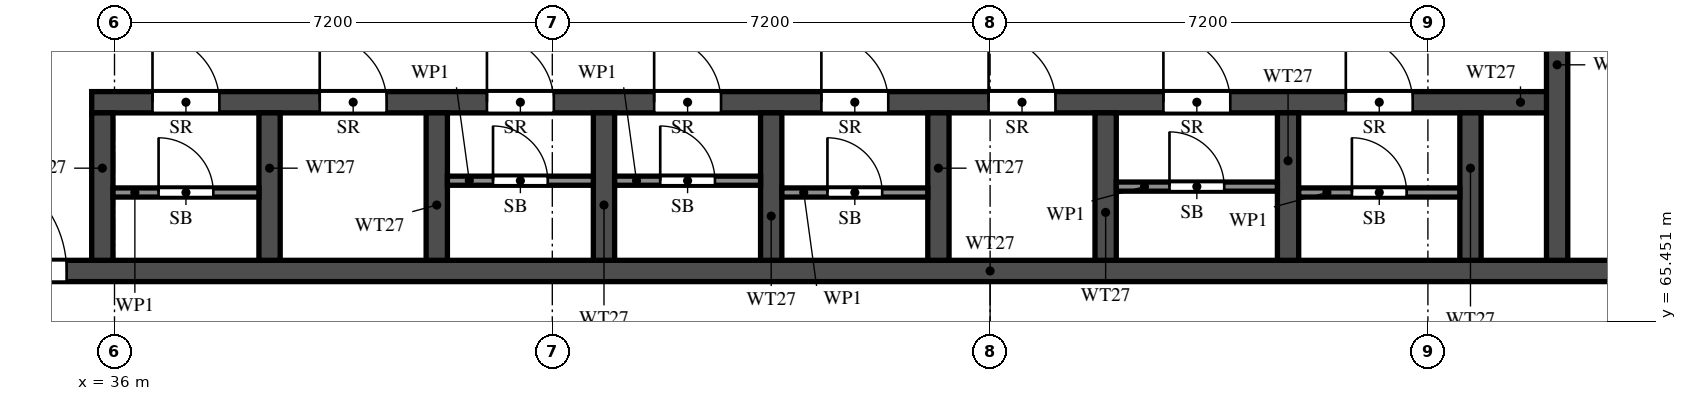
"""IFC4 building model, lengths in metres.
Left out: names, types, materials, properties, quantities, classifications, styles, units other than length and angle.
Written with IfcOpenShell. Run it as: python <this file> out.ifc"""

import sys

from ifc_helpers import new_model, si_unit, direction, frame, frame_2d, origin, place, context, subcontext, project, spatial, rectangle, extrude, element, fill, save


model = new_model("IFC4")
c1 = context("Model", 3, precision=1e-05, world=origin(), true_north=direction((0.0, 1.0)))
c2 = subcontext(c1, "Body", "Model", "MODEL_VIEW")
j1 = project(units=[si_unit("LENGTHUNIT", "METRE"), si_unit("PLANEANGLEUNIT", "RADIAN")], contexts=[c1])
p1 = place(None, origin())
s1 = spatial("IfcSite", under=j1, at=p1, CompositionType="ELEMENT")
p2 = place(p1, origin())
s2 = spatial("IfcBuilding", under=s1, at=p2, CompositionType="ELEMENT")
p3 = place(p2, frame((0.0, 0.0, 178.0)))
s3 = spatial("IfcBuildingStorey", under=s2, at=p3, CompositionType="ELEMENT", Elevation=178.0)
p4 = place(p3, frame((29.7, 66.275, 0.0), z_axis=(0.0, 0.0, 1.0), x_axis=(1.0, 0.0, 0.0)))
e1 = element("IfcWall", 1, at=p4, inside=s3, PredefinedType="SHEAR", context=c2, shape_type="SweptSolid", body=[
    extrude(rectangle(XDim=41.4, YDim=0.35, at=frame_2d((20.7, 0.0))), origin(), (0.0, 0.0, 1.0), 3.2),
])
p5 = place(p4, frame((0.925, 0.0, 0.0)))
e2 = element("IfcOpeningElement", 2, at=p5, cuts=e1, PredefinedType="OPENING", context=c2, shape_type="SweptSolid", body=[
    extrude(rectangle(XDim=1.1, YDim=2.1, at=frame_2d((0.55, 1.05))), frame((0.0, 0.185, 0.0), z_axis=(0.0, -1.0, 0.0), x_axis=(1.0, 0.0, 0.0)), (0.0, 0.0, 1.0), 0.37),
])
p6 = place(p4, frame((3.712, 0.0, 0.0)))
e3 = element("IfcOpeningElement", 3, at=p6, cuts=e1, PredefinedType="OPENING", context=c2, shape_type="SweptSolid", body=[
    extrude(rectangle(XDim=1.8, YDim=2.1, at=frame_2d((0.9, 1.05))), frame((0.0, 0.185, 0.0), z_axis=(0.0, -1.0, 0.0), x_axis=(1.0, 0.0, 0.0)), (0.0, 0.0, 1.0), 0.37),
])
p7 = place(p3, frame((35.625, 69.05, 0.0), z_axis=(0.0, 0.0, 1.0), x_axis=(1.0, 0.0, 0.0)))
e4 = element("IfcWall", 4, at=p7, inside=s3, PredefinedType="SHEAR", context=c2, shape_type="SweptSolid", body=[
    extrude(rectangle(XDim=24.1, YDim=0.35, at=frame_2d((12.05, 0.0))), origin(), (0.0, 0.0, 1.0), 3.2),
])
p8 = place(p7, frame((1.0, 0.0, 0.0)))
e5 = element("IfcOpeningElement", 5, at=p8, cuts=e4, PredefinedType="OPENING", context=c2, shape_type="SweptSolid", body=[
    extrude(rectangle(XDim=1.1, YDim=2.1, at=frame_2d((0.55, 1.05))), frame((0.0, 0.185, 0.0), z_axis=(0.0, -1.0, 0.0), x_axis=(1.0, 0.0, 0.0)), (0.0, 0.0, 1.0), 0.37),
])
p9 = place(p7, frame((3.75, 0.0, 0.0)))
e6 = element("IfcOpeningElement", 6, at=p9, cuts=e4, PredefinedType="OPENING", context=c2, shape_type="SweptSolid", body=[
    extrude(rectangle(XDim=1.1, YDim=2.1, at=frame_2d((0.55, 1.05))), frame((0.0, 0.185, 0.0), z_axis=(0.0, -1.0, 0.0), x_axis=(1.0, 0.0, 0.0)), (0.0, 0.0, 1.0), 0.37),
])
p10 = place(p7, frame((6.5, 0.0, 0.0)))
e7 = element("IfcOpeningElement", 7, at=p10, cuts=e4, PredefinedType="OPENING", context=c2, shape_type="SweptSolid", body=[
    extrude(rectangle(XDim=1.1, YDim=2.1, at=frame_2d((0.55, 1.05))), frame((0.0, 0.185, 0.0), z_axis=(0.0, -1.0, 0.0), x_axis=(1.0, 0.0, 0.0)), (0.0, 0.0, 1.0), 0.37),
])
p11 = place(p7, frame((9.25, 0.0, 0.0)))
e8 = element("IfcOpeningElement", 8, at=p11, cuts=e4, PredefinedType="OPENING", context=c2, shape_type="SweptSolid", body=[
    extrude(rectangle(XDim=1.1, YDim=2.1, at=frame_2d((0.55, 1.05))), frame((0.0, 0.185, 0.0), z_axis=(0.0, -1.0, 0.0), x_axis=(1.0, 0.0, 0.0)), (0.0, 0.0, 1.0), 0.37),
])
p12 = place(p7, frame((12.0, 0.0, 0.0)))
e9 = element("IfcOpeningElement", 9, at=p12, cuts=e4, PredefinedType="OPENING", context=c2, shape_type="SweptSolid", body=[
    extrude(rectangle(XDim=1.1, YDim=2.1, at=frame_2d((0.55, 1.05))), frame((0.0, 0.185, 0.0), z_axis=(0.0, -1.0, 0.0), x_axis=(1.0, 0.0, 0.0)), (0.0, 0.0, 1.0), 0.37),
])
p13 = place(p7, frame((14.75, 0.0, 0.0)))
e10 = element("IfcOpeningElement", 10, at=p13, cuts=e4, PredefinedType="OPENING", context=c2, shape_type="SweptSolid", body=[
    extrude(rectangle(XDim=1.1, YDim=2.1, at=frame_2d((0.55, 1.05))), frame((0.0, 0.185, 0.0), z_axis=(0.0, -1.0, 0.0), x_axis=(1.0, 0.0, 0.0)), (0.0, 0.0, 1.0), 0.37),
])
p14 = place(p7, frame((17.625, 0.0, 0.0)))
e11 = element("IfcOpeningElement", 11, at=p14, cuts=e4, PredefinedType="OPENING", context=c2, shape_type="SweptSolid", body=[
    extrude(rectangle(XDim=1.1, YDim=2.1, at=frame_2d((0.55, 1.05))), frame((0.0, 0.185, 0.0), z_axis=(0.0, -1.0, 0.0), x_axis=(1.0, 0.0, 0.0)), (0.0, 0.0, 1.0), 0.37),
])
p15 = place(p7, frame((20.625, 0.0, 0.0)))
e12 = element("IfcOpeningElement", 12, at=p15, cuts=e4, PredefinedType="OPENING", context=c2, shape_type="SweptSolid", body=[
    extrude(rectangle(XDim=1.1, YDim=2.1, at=frame_2d((0.55, 1.05))), frame((0.0, 0.185, 0.0), z_axis=(0.0, -1.0, 0.0), x_axis=(1.0, 0.0, 0.0)), (0.0, 0.0, 1.0), 0.37),
])
p16 = place(p3, frame((59.725, 66.45, 0.0), z_axis=(0.0, 0.0, 1.0), x_axis=(0.0, 1.0, 0.0)))
e13 = element("IfcWall", 13, at=p16, inside=s3, PredefinedType="SHEAR", context=c2, shape_type="SweptSolid", body=[
    extrude(rectangle(XDim=6.125, YDim=0.35, at=frame_2d((3.062, 0.0))), origin(), (0.0, 0.0, 1.0), 3.2),
])
p17 = place(p16, frame((3.85, 0.0, 0.0)))
e14 = element("IfcOpeningElement", 14, at=p17, cuts=e13, PredefinedType="OPENING", context=c2, shape_type="SweptSolid", body=[
    extrude(rectangle(XDim=1.2, YDim=2.1, at=frame_2d((0.6, 1.05))), frame((0.0, 0.185, 0.0), z_axis=(0.0, -1.0, 0.0), x_axis=(1.0, 0.0, 0.0)), (0.0, 0.0, 1.0), 0.37),
])
for number, where, z_axis, x_axis in (
    (15, (35.8, 66.45, 0.0), (0.0, 0.0, 1.0), (0.0, 1.0, 0.0)),
    (16, (38.55, 66.45, 0.0), (0.0, 0.0, 1.0), (0.0, 1.0, 0.0)),
    (17, (41.3, 66.45, 0.0), (0.0, 0.0, 1.0), (0.0, 1.0, 0.0)),
    (18, (44.05, 66.45, 0.0), (0.0, 0.0, 1.0), (0.0, 1.0, 0.0)),
    (19, (46.8, 66.45, 0.0), (0.0, 0.0, 1.0), (0.0, 1.0, 0.0)),
    (20, (49.55, 66.45, 0.0), (0.0, 0.0, 1.0), (0.0, 1.0, 0.0)),
    (21, (52.3, 66.45, 0.0), (0.0, 0.0, 1.0), (0.0, 1.0, 0.0)),
    (22, (55.3, 66.45, 0.0), (0.0, 0.0, 1.0), (0.0, 1.0, 0.0)),
    (23, (58.3, 66.45, 0.0), (0.0, 0.0, 1.0), (0.0, 1.0, 0.0)),
):
    element("IfcWall", number, at=place(p3, frame(where, z_axis=z_axis, x_axis=x_axis)), inside=s3, PredefinedType="SHEAR", context=c2, shape_type="SweptSolid", body=[
        extrude(rectangle(XDim=2.425, YDim=0.35, at=frame_2d((1.212, 0.0))), origin(), (0.0, 0.0, 1.0), 3.2),
    ])
p18 = place(p3, frame((35.975, 67.565, 0.0), z_axis=(0.0, 0.0, 1.0), x_axis=(1.0, 0.0, 0.0)))
e24 = element("IfcWall", 24, at=p18, inside=s3, PredefinedType="PARTITIONING", context=c2, shape_type="SweptSolid", body=[
    extrude(rectangle(XDim=2.4, YDim=0.15, at=frame_2d((1.2, 0.0))), origin(), (0.0, 0.0, 1.0), 3.2),
])
p19 = place(p18, frame((0.75, 0.0, 0.0)))
e25 = element("IfcOpeningElement", 25, at=p19, cuts=e24, PredefinedType="OPENING", context=c2, shape_type="SweptSolid", body=[
    extrude(rectangle(XDim=0.9, YDim=2.1, at=frame_2d((0.45, 1.05))), frame((0.0, 0.085, 0.0), z_axis=(0.0, -1.0, 0.0), x_axis=(1.0, 0.0, 0.0)), (0.0, 0.0, 1.0), 0.17),
])
p20 = place(p3, frame((41.475, 67.76, 0.0), z_axis=(0.0, 0.0, 1.0), x_axis=(1.0, 0.0, 0.0)))
e26 = element("IfcWall", 26, at=p20, inside=s3, PredefinedType="PARTITIONING", context=c2, shape_type="SweptSolid", body=[
    extrude(rectangle(XDim=2.4, YDim=0.15, at=frame_2d((1.2, 0.0))), origin(), (0.0, 0.0, 1.0), 3.2),
])
p21 = place(p20, frame((0.75, 0.0, 0.0)))
e27 = element("IfcOpeningElement", 27, at=p21, cuts=e26, PredefinedType="OPENING", context=c2, shape_type="SweptSolid", body=[
    extrude(rectangle(XDim=0.9, YDim=2.1, at=frame_2d((0.45, 1.05))), frame((0.0, 0.085, 0.0), z_axis=(0.0, -1.0, 0.0), x_axis=(1.0, 0.0, 0.0)), (0.0, 0.0, 1.0), 0.17),
])
p22 = place(p3, frame((44.225, 67.76, 0.0), z_axis=(0.0, 0.0, 1.0), x_axis=(1.0, 0.0, 0.0)))
e28 = element("IfcWall", 28, at=p22, inside=s3, PredefinedType="PARTITIONING", context=c2, shape_type="SweptSolid", body=[
    extrude(rectangle(XDim=2.4, YDim=0.15, at=frame_2d((1.2, 0.0))), origin(), (0.0, 0.0, 1.0), 3.2),
])
p23 = place(p22, frame((0.75, 0.0, 0.0)))
e29 = element("IfcOpeningElement", 29, at=p23, cuts=e28, PredefinedType="OPENING", context=c2, shape_type="SweptSolid", body=[
    extrude(rectangle(XDim=0.9, YDim=2.1, at=frame_2d((0.45, 1.05))), frame((0.0, 0.085, 0.0), z_axis=(0.0, -1.0, 0.0), x_axis=(1.0, 0.0, 0.0)), (0.0, 0.0, 1.0), 0.17),
])
p24 = place(p3, frame((46.975, 67.565, 0.0), z_axis=(0.0, 0.0, 1.0), x_axis=(1.0, 0.0, 0.0)))
e30 = element("IfcWall", 30, at=p24, inside=s3, PredefinedType="PARTITIONING", context=c2, shape_type="SweptSolid", body=[
    extrude(rectangle(XDim=2.4, YDim=0.15, at=frame_2d((1.2, 0.0))), origin(), (0.0, 0.0, 1.0), 3.2),
])
p25 = place(p24, frame((0.75, 0.0, 0.0)))
e31 = element("IfcOpeningElement", 31, at=p25, cuts=e30, PredefinedType="OPENING", context=c2, shape_type="SweptSolid", body=[
    extrude(rectangle(XDim=0.9, YDim=2.1, at=frame_2d((0.45, 1.05))), frame((0.0, 0.085, 0.0), z_axis=(0.0, -1.0, 0.0), x_axis=(1.0, 0.0, 0.0)), (0.0, 0.0, 1.0), 0.17),
])
p26 = place(p3, frame((52.475, 67.663, 0.0), z_axis=(0.0, 0.0, 1.0), x_axis=(1.0, 0.0, 0.0)))
e32 = element("IfcWall", 32, at=p26, inside=s3, PredefinedType="PARTITIONING", context=c2, shape_type="SweptSolid", body=[
    extrude(rectangle(XDim=2.65, YDim=0.15, at=frame_2d((1.325, 0.0))), origin(), (0.0, 0.0, 1.0), 3.2),
])
p27 = place(p26, frame((0.875, 0.0, 0.0)))
e33 = element("IfcOpeningElement", 33, at=p27, cuts=e32, PredefinedType="OPENING", context=c2, shape_type="SweptSolid", body=[
    extrude(rectangle(XDim=0.9, YDim=2.1, at=frame_2d((0.45, 1.05))), frame((0.0, 0.085, 0.0), z_axis=(0.0, -1.0, 0.0), x_axis=(1.0, 0.0, 0.0)), (0.0, 0.0, 1.0), 0.17),
])
p28 = place(p3, frame((55.475, 67.565, 0.0), z_axis=(0.0, 0.0, 1.0), x_axis=(1.0, 0.0, 0.0)))
e34 = element("IfcWall", 34, at=p28, inside=s3, PredefinedType="PARTITIONING", context=c2, shape_type="SweptSolid", body=[
    extrude(rectangle(XDim=2.65, YDim=0.15, at=frame_2d((1.325, 0.0))), origin(), (0.0, 0.0, 1.0), 3.2),
])
p29 = place(p28, frame((0.875, 0.0, 0.0)))
e35 = element("IfcOpeningElement", 35, at=p29, cuts=e34, PredefinedType="OPENING", context=c2, shape_type="SweptSolid", body=[
    extrude(rectangle(XDim=0.9, YDim=2.1, at=frame_2d((0.45, 1.05))), frame((0.0, 0.085, 0.0), z_axis=(0.0, -1.0, 0.0), x_axis=(1.0, 0.0, 0.0)), (0.0, 0.0, 1.0), 0.17),
])
p30 = place(p6, origin())
e36 = element("IfcDoor", 36, at=p30, inside=s3, OperationType="DOUBLE_DOOR_SINGLE_SWING", PredefinedType="DOOR", context=c2, shape_type="SweptSolid", body=[
    extrude(rectangle(XDim=1.8, YDim=2.1, at=frame_2d((0.9, 1.05))), frame((0.0, 0.025, 0.0), z_axis=(0.0, -1.0, 0.0), x_axis=(1.0, 0.0, 0.0)), (0.0, 0.0, 1.0), 0.05),
])
fill(e3, e36)
p31 = place(p8, origin())
e37 = element("IfcDoor", 37, at=p31, inside=s3, OperationType="SINGLE_SWING_RIGHT", PredefinedType="DOOR", context=c2, shape_type="SweptSolid", body=[
    extrude(rectangle(XDim=1.1, YDim=2.1, at=frame_2d((0.55, 1.05))), frame((0.0, 0.025, 0.0), z_axis=(0.0, -1.0, 0.0), x_axis=(1.0, 0.0, 0.0)), (0.0, 0.0, 1.0), 0.05),
])
fill(e5, e37)
p32 = place(p19, origin())
e38 = element("IfcDoor", 38, at=p32, inside=s3, OperationType="SINGLE_SWING_RIGHT", PredefinedType="DOOR", context=c2, shape_type="SweptSolid", body=[
    extrude(rectangle(XDim=0.9, YDim=2.1, at=frame_2d((0.45, 1.05))), frame((0.0, 0.025, 0.0), z_axis=(0.0, -1.0, 0.0), x_axis=(1.0, 0.0, 0.0)), (0.0, 0.0, 1.0), 0.05),
])
fill(e25, e38)
p33 = place(p9, origin())
e39 = element("IfcDoor", 39, at=p33, inside=s3, OperationType="SINGLE_SWING_LEFT", PredefinedType="DOOR", context=c2, shape_type="SweptSolid", body=[
    extrude(rectangle(XDim=1.1, YDim=2.1, at=frame_2d((0.55, 1.05))), frame((0.0, 0.025, 0.0), z_axis=(0.0, -1.0, 0.0), x_axis=(1.0, 0.0, 0.0)), (0.0, 0.0, 1.0), 0.05),
])
fill(e6, e39)
p34 = place(p10, origin())
e40 = element("IfcDoor", 40, at=p34, inside=s3, OperationType="SINGLE_SWING_RIGHT", PredefinedType="DOOR", context=c2, shape_type="SweptSolid", body=[
    extrude(rectangle(XDim=1.1, YDim=2.1, at=frame_2d((0.55, 1.05))), frame((0.0, 0.025, 0.0), z_axis=(0.0, -1.0, 0.0), x_axis=(1.0, 0.0, 0.0)), (0.0, 0.0, 1.0), 0.05),
])
fill(e7, e40)
p35 = place(p21, origin())
e41 = element("IfcDoor", 41, at=p35, inside=s3, OperationType="SINGLE_SWING_LEFT", PredefinedType="DOOR", context=c2, shape_type="SweptSolid", body=[
    extrude(rectangle(XDim=0.9, YDim=2.1, at=frame_2d((0.45, 1.05))), frame((0.0, 0.025, 0.0), z_axis=(0.0, -1.0, 0.0), x_axis=(1.0, 0.0, 0.0)), (0.0, 0.0, 1.0), 0.05),
])
fill(e27, e41)
p36 = place(p11, origin())
e42 = element("IfcDoor", 42, at=p36, inside=s3, OperationType="SINGLE_SWING_LEFT", PredefinedType="DOOR", context=c2, shape_type="SweptSolid", body=[
    extrude(rectangle(XDim=1.1, YDim=2.1, at=frame_2d((0.55, 1.05))), frame((0.0, 0.025, 0.0), z_axis=(0.0, -1.0, 0.0), x_axis=(1.0, 0.0, 0.0)), (0.0, 0.0, 1.0), 0.05),
])
fill(e8, e42)
p37 = place(p23, origin())
e43 = element("IfcDoor", 43, at=p37, inside=s3, OperationType="SINGLE_SWING_RIGHT", PredefinedType="DOOR", context=c2, shape_type="SweptSolid", body=[
    extrude(rectangle(XDim=0.9, YDim=2.1, at=frame_2d((0.45, 1.05))), frame((0.0, 0.025, 0.0), z_axis=(0.0, -1.0, 0.0), x_axis=(1.0, 0.0, 0.0)), (0.0, 0.0, 1.0), 0.05),
])
fill(e29, e43)
p38 = place(p12, origin())
e44 = element("IfcDoor", 44, at=p38, inside=s3, OperationType="SINGLE_SWING_RIGHT", PredefinedType="DOOR", context=c2, shape_type="SweptSolid", body=[
    extrude(rectangle(XDim=1.1, YDim=2.1, at=frame_2d((0.55, 1.05))), frame((0.0, 0.025, 0.0), z_axis=(0.0, -1.0, 0.0), x_axis=(1.0, 0.0, 0.0)), (0.0, 0.0, 1.0), 0.05),
])
fill(e9, e44)
p39 = place(p25, origin())
e45 = element("IfcDoor", 45, at=p39, inside=s3, OperationType="SINGLE_SWING_RIGHT", PredefinedType="DOOR", context=c2, shape_type="SweptSolid", body=[
    extrude(rectangle(XDim=0.9, YDim=2.1, at=frame_2d((0.45, 1.05))), frame((0.0, 0.025, 0.0), z_axis=(0.0, -1.0, 0.0), x_axis=(1.0, 0.0, 0.0)), (0.0, 0.0, 1.0), 0.05),
])
fill(e31, e45)
p40 = place(p13, origin())
e46 = element("IfcDoor", 46, at=p40, inside=s3, OperationType="SINGLE_SWING_LEFT", PredefinedType="DOOR", context=c2, shape_type="SweptSolid", body=[
    extrude(rectangle(XDim=1.1, YDim=2.1, at=frame_2d((0.55, 1.05))), frame((0.0, 0.025, 0.0), z_axis=(0.0, -1.0, 0.0), x_axis=(1.0, 0.0, 0.0)), (0.0, 0.0, 1.0), 0.05),
])
fill(e10, e46)
p41 = place(p14, origin())
e47 = element("IfcDoor", 47, at=p41, inside=s3, OperationType="SINGLE_SWING_RIGHT", PredefinedType="DOOR", context=c2, shape_type="SweptSolid", body=[
    extrude(rectangle(XDim=1.1, YDim=2.1, at=frame_2d((0.55, 1.05))), frame((0.0, 0.025, 0.0), z_axis=(0.0, -1.0, 0.0), x_axis=(1.0, 0.0, 0.0)), (0.0, 0.0, 1.0), 0.05),
])
fill(e11, e47)
p42 = place(p27, origin())
e48 = element("IfcDoor", 48, at=p42, inside=s3, OperationType="SINGLE_SWING_LEFT", PredefinedType="DOOR", context=c2, shape_type="SweptSolid", body=[
    extrude(rectangle(XDim=0.9, YDim=2.1, at=frame_2d((0.45, 1.05))), frame((0.0, 0.025, 0.0), z_axis=(0.0, -1.0, 0.0), x_axis=(1.0, 0.0, 0.0)), (0.0, 0.0, 1.0), 0.05),
])
fill(e33, e48)
p43 = place(p15, origin())
e49 = element("IfcDoor", 49, at=p43, inside=s3, OperationType="SINGLE_SWING_RIGHT", PredefinedType="DOOR", context=c2, shape_type="SweptSolid", body=[
    extrude(rectangle(XDim=1.1, YDim=2.1, at=frame_2d((0.55, 1.05))), frame((0.0, 0.025, 0.0), z_axis=(0.0, -1.0, 0.0), x_axis=(1.0, 0.0, 0.0)), (0.0, 0.0, 1.0), 0.05),
])
fill(e12, e49)
p44 = place(p29, origin())
e50 = element("IfcDoor", 50, at=p44, inside=s3, OperationType="SINGLE_SWING_RIGHT", PredefinedType="DOOR", context=c2, shape_type="SweptSolid", body=[
    extrude(rectangle(XDim=0.9, YDim=2.1, at=frame_2d((0.45, 1.05))), frame((0.0, 0.025, 0.0), z_axis=(0.0, -1.0, 0.0), x_axis=(1.0, 0.0, 0.0)), (0.0, 0.0, 1.0), 0.05),
])
fill(e35, e50)
save(model, sys.argv[1])
